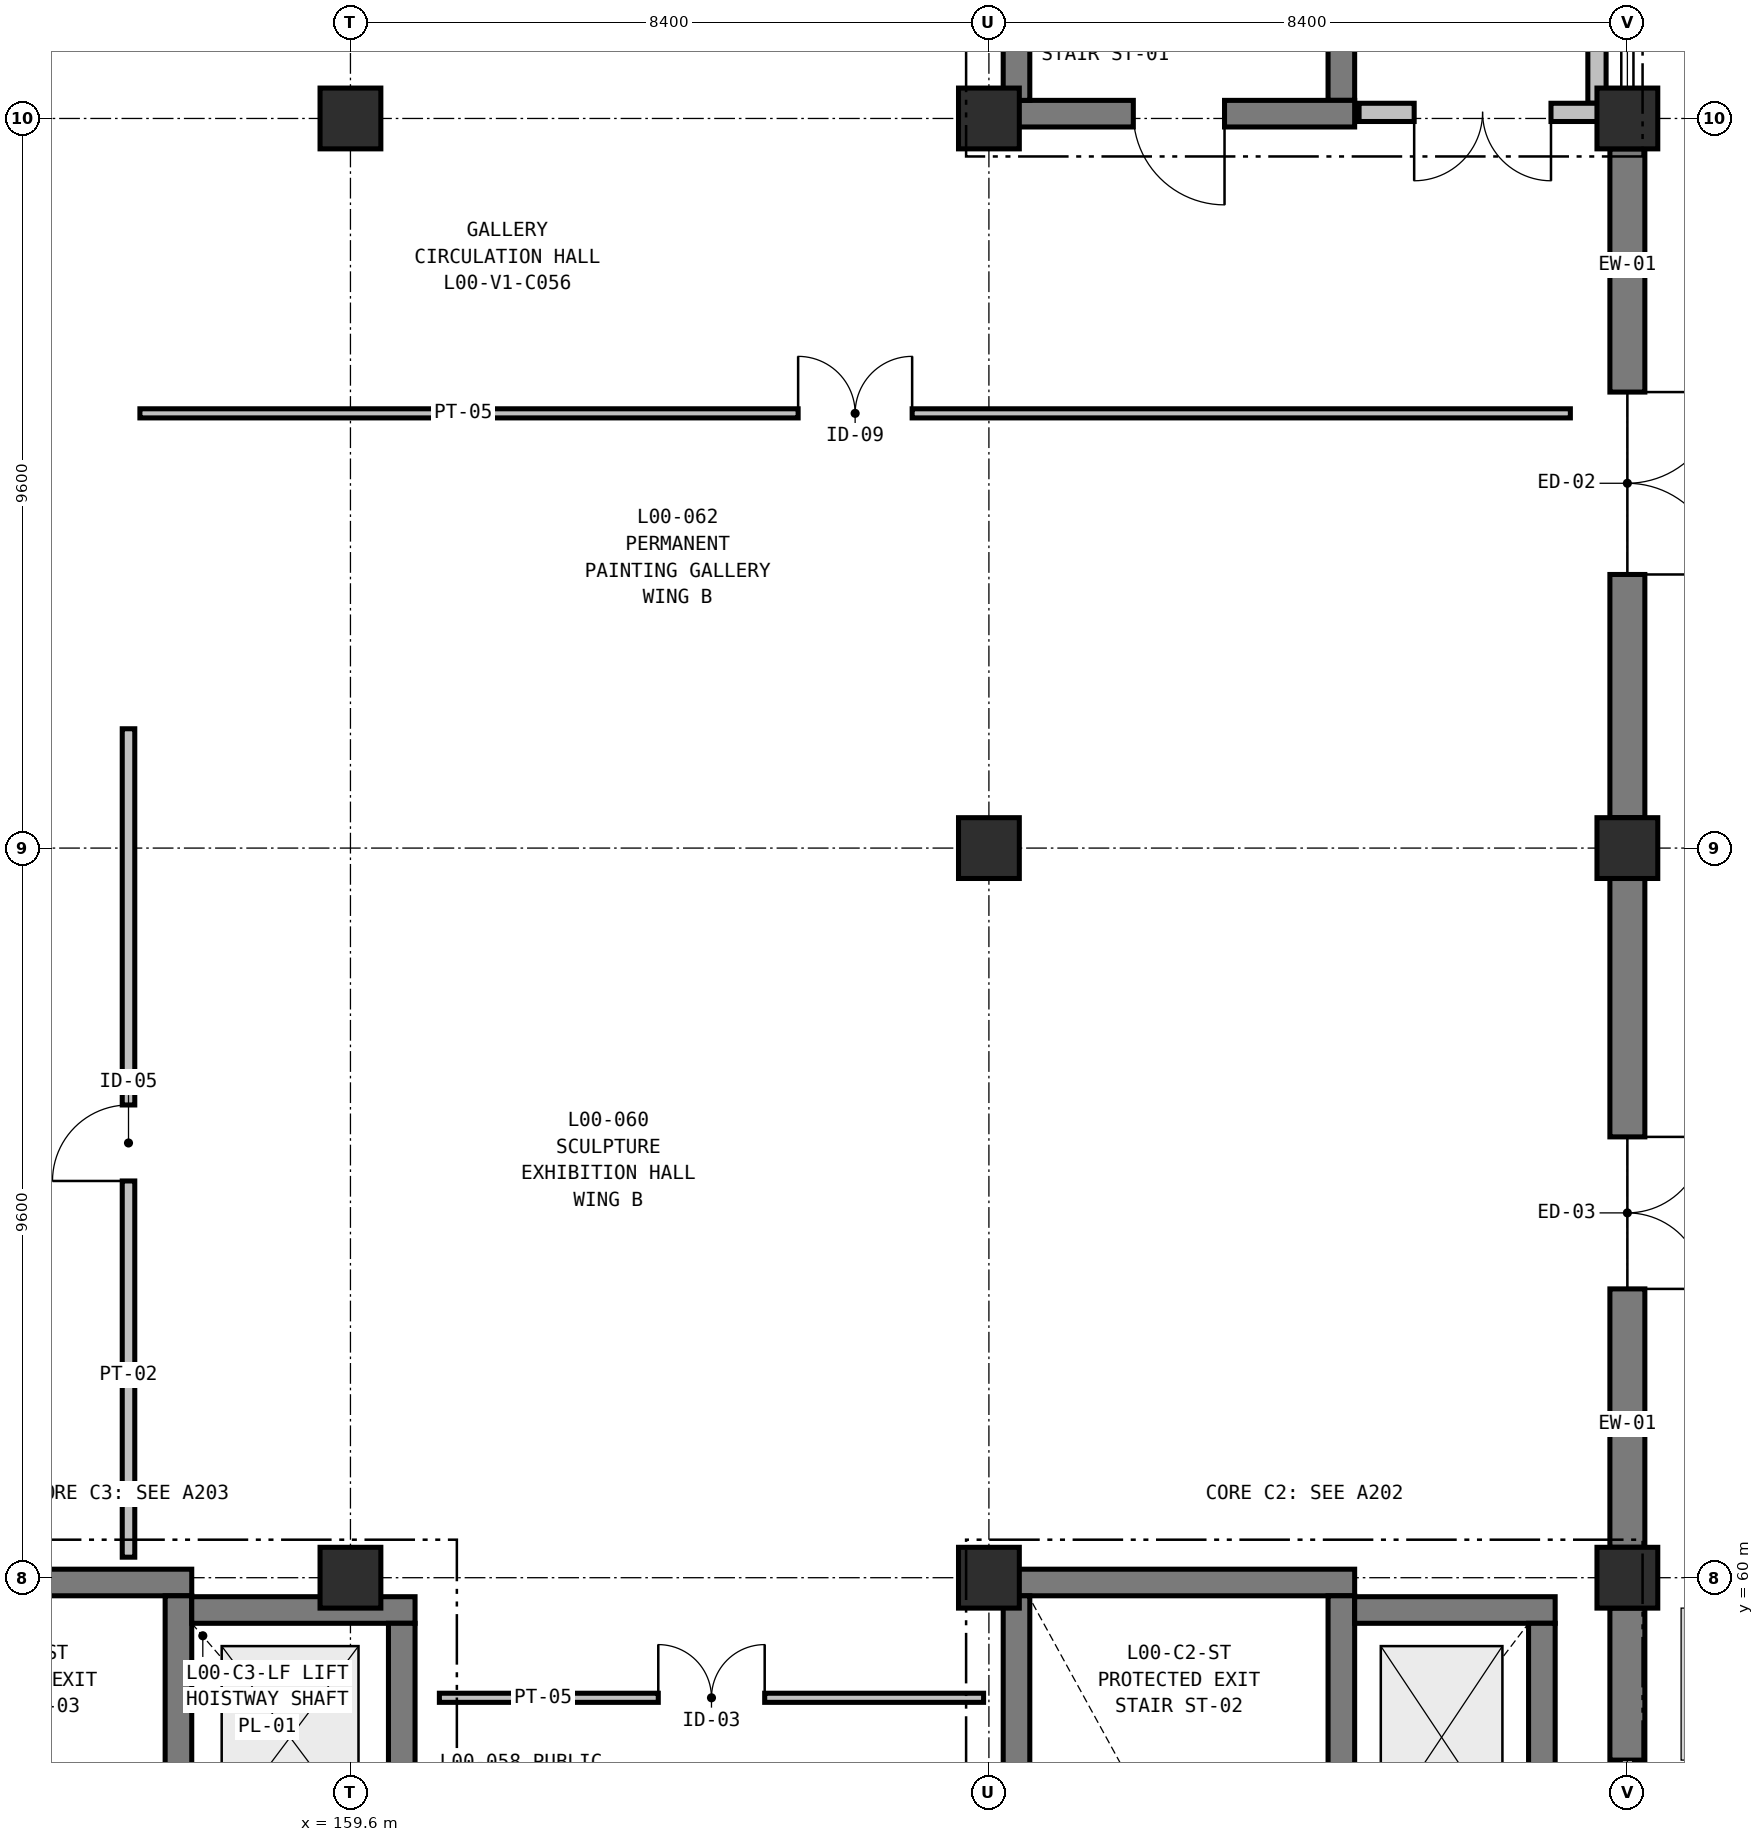
"""IFC4 building model, lengths in metres.
Left out: names, types, materials, properties, quantities, classifications, styles, units other than length and angle.
Written with IfcOpenShell. Run it as: python <this file> out.ifc"""

import sys

from ifc_helpers import new_model, si_unit, direction, frame, frame_2d, origin, origin_2d, place, context, subcontext, project, spatial, rectangle, extrude, element, fill, save


model = new_model("IFC4")
c1 = context("Model", 3, precision=1e-05, world=origin(), true_north=direction((0.0, 1.0)))
c2 = subcontext(c1, "Body", "Model", "MODEL_VIEW")
j1 = project(units=[si_unit("LENGTHUNIT", "METRE"), si_unit("PLANEANGLEUNIT", "RADIAN")], contexts=[c1])
p1 = place(None, origin())
s1 = spatial("IfcSite", under=j1, at=p1, CompositionType="ELEMENT")
p2 = place(p1, origin())
s2 = spatial("IfcBuilding", under=s1, at=p2, CompositionType="ELEMENT")
p3 = place(p2, origin())
s3 = spatial("IfcBuildingStorey", under=s2, at=p3, CompositionType="ELEMENT", Elevation=0.0)
for number, where, z_axis, x_axis in (
    (1, (159.6, 60.0, 0.0), (0.0, 0.0, 1.0), (1.0, 0.0, 0.0)),
    (2, (159.6, 79.2, 0.0), (0.0, 0.0, 1.0), (1.0, 0.0, 0.0)),
    (3, (168.0, 60.0, 0.0), (0.0, 0.0, 1.0), (1.0, 0.0, 0.0)),
    (4, (168.0, 69.6, 0.0), (0.0, 0.0, 1.0), (1.0, 0.0, 0.0)),
    (5, (168.0, 79.2, 0.0), (0.0, 0.0, 1.0), (1.0, 0.0, 0.0)),
    (6, (176.4, 60.0, 0.0), (0.0, 0.0, 1.0), (1.0, 0.0, 0.0)),
    (7, (176.4, 69.6, 0.0), (0.0, 0.0, 1.0), (1.0, 0.0, 0.0)),
    (8, (176.4, 79.2, 0.0), (0.0, 0.0, 1.0), (1.0, 0.0, 0.0)),
):
    element("IfcColumn", number, at=place(p3, frame(where, z_axis=z_axis, x_axis=x_axis)), inside=s3, PredefinedType="COLUMN", context=c2, shape_type="SweptSolid", body=[
        extrude(rectangle(XDim=0.8, YDim=0.8, at=origin_2d()), origin(), (0.0, 0.0, 1.0), 6.0),
    ])
p4 = place(p3, frame((176.4, 78.8, 0.0), z_axis=(0.0, 0.0, 1.0), x_axis=(0.0, -1.0, 0.0)))
e9 = element("IfcWall", 9, at=p4, inside=s3, PredefinedType="SOLIDWALL", context=c2, shape_type="SweptSolid", body=[
    extrude(rectangle(XDim=8.8, YDim=0.46, at=frame_2d((4.4, 0.0))), origin(), (0.0, 0.0, 1.0), 5.68),
])
p5 = place(p4, frame((3.2, 0.0, 0.0)))
e10 = element("IfcOpeningElement", 10, at=p5, cuts=e9, PredefinedType="OPENING", context=c2, shape_type="SweptSolid", body=[
    extrude(rectangle(XDim=2.4, YDim=2.4, at=frame_2d((1.2, 1.2))), frame((0.0, 0.24, 0.0), z_axis=(0.0, -1.0, 0.0), x_axis=(1.0, 0.0, 0.0)), (0.0, 0.0, 1.0), 0.48),
])
p6 = place(p3, frame((176.4, 69.2, 0.0), z_axis=(0.0, 0.0, 1.0), x_axis=(0.0, -1.0, 0.0)))
e11 = element("IfcWall", 11, at=p6, inside=s3, PredefinedType="SOLIDWALL", context=c2, shape_type="SweptSolid", body=[
    extrude(rectangle(XDim=8.8, YDim=0.46, at=frame_2d((4.4, 0.0))), origin(), (0.0, 0.0, 1.0), 5.68),
])
p7 = place(p6, frame((3.4, 0.0, 0.0)))
e12 = element("IfcOpeningElement", 12, at=p7, cuts=e11, PredefinedType="OPENING", context=c2, shape_type="SweptSolid", body=[
    extrude(rectangle(XDim=2.0, YDim=2.3, at=frame_2d((1.0, 1.15))), frame((0.0, 0.24, 0.0), z_axis=(0.0, -1.0, 0.0), x_axis=(1.0, 0.0, 0.0)), (0.0, 0.0, 1.0), 0.48),
])
p8 = place(p3, frame((176.4, 59.6, 0.0), z_axis=(0.0, 0.0, 1.0), x_axis=(0.0, -1.0, 0.0)))
e13 = element("IfcWall", 13, at=p8, inside=s3, PredefinedType="SOLIDWALL", context=c2, shape_type="SweptSolid", body=[
    extrude(rectangle(XDim=2.0, YDim=0.46, at=frame_2d((1.0, 0.0))), origin(), (0.0, 0.0, 1.0), 5.68),
])
p9 = place(p3, frame((172.637, 88.562, 0.0), z_axis=(0.0, 0.0, 1.0), x_axis=(0.0, -1.0, 0.0)))
e14 = element("IfcWall", 14, at=p9, inside=s3, PredefinedType="SHEAR", context=c2, shape_type="SweptSolid", body=[
    extrude(rectangle(XDim=9.124, YDim=0.35, at=frame_2d((4.562, 0.0))), origin(), (0.0, 0.0, 1.0), 5.68),
])
p10 = place(p3, frame((172.812, 79.263, 0.0), z_axis=(0.0, 0.0, 1.0), x_axis=(-1.0, 0.0, 0.0)))
e15 = element("IfcWall", 15, at=p10, inside=s3, PredefinedType="SHEAR", context=c2, shape_type="SweptSolid", body=[
    extrude(rectangle(XDim=4.624, YDim=0.35, at=frame_2d((2.312, 0.0))), origin(), (0.0, 0.0, 1.0), 5.68),
])
p11 = place(p10, frame((1.712, 0.0, 0.0)))
e16 = element("IfcOpeningElement", 16, at=p11, cuts=e15, PredefinedType="OPENING", context=c2, shape_type="SweptSolid", body=[
    extrude(rectangle(XDim=1.2, YDim=2.2, at=frame_2d((0.6, 1.1))), frame((0.0, 0.185, 0.0), z_axis=(0.0, -1.0, 0.0), x_axis=(1.0, 0.0, 0.0)), (0.0, 0.0, 1.0), 0.37),
])
p12 = place(p3, frame((168.363, 79.438, 0.0), z_axis=(0.0, 0.0, 1.0), x_axis=(0.0, 1.0, 0.0)))
e17 = element("IfcWall", 17, at=p12, inside=s3, PredefinedType="SHEAR", context=c2, shape_type="SweptSolid", body=[
    extrude(rectangle(XDim=9.124, YDim=0.35, at=frame_2d((4.562, 0.0))), origin(), (0.0, 0.0, 1.0), 5.68),
])
p13 = place(p3, frame((176.0, 84.9, 0.0), z_axis=(0.0, 0.0, 1.0), x_axis=(0.0, -1.0, 0.0)))
e18 = element("IfcWall", 18, at=p13, inside=s3, PredefinedType="PARTITIONING", context=c2, shape_type="SweptSolid", body=[
    extrude(rectangle(XDim=5.5, YDim=0.24, at=frame_2d((2.75, 0.0))), origin(), (0.0, 0.0, 1.0), 5.005),
])
p14 = place(p3, frame((176.12, 79.28, 0.0), z_axis=(0.0, 0.0, 1.0), x_axis=(-1.0, 0.0, 0.0)))
e19 = element("IfcWall", 19, at=p14, inside=s3, PredefinedType="PARTITIONING", context=c2, shape_type="SweptSolid", body=[
    extrude(rectangle(XDim=3.25, YDim=0.24, at=frame_2d((1.625, 0.0))), origin(), (0.0, 0.0, 1.0), 5.005),
])
p15 = place(p14, frame((0.725, 0.0, 0.0)))
e20 = element("IfcOpeningElement", 20, at=p15, cuts=e19, PredefinedType="OPENING", context=c2, shape_type="SweptSolid", body=[
    extrude(rectangle(XDim=1.8, YDim=2.25, at=frame_2d((0.9, 1.125))), frame((0.0, 0.13, 0.0), z_axis=(0.0, -1.0, 0.0), x_axis=(1.0, 0.0, 0.0)), (0.0, 0.0, 1.0), 0.26),
])
p16 = place(p3, frame((168.188, 59.937, 0.0), z_axis=(0.0, 0.0, 1.0), x_axis=(1.0, 0.0, 0.0)))
e21 = element("IfcWall", 21, at=p16, inside=s3, PredefinedType="SHEAR", context=c2, shape_type="SweptSolid", body=[
    extrude(rectangle(XDim=4.624, YDim=0.35, at=frame_2d((2.312, 0.0))), origin(), (0.0, 0.0, 1.0), 5.68),
])
for number, where, z_axis, x_axis in (
    (22, (172.637, 59.762, 0.0), (0.0, 0.0, 1.0), (0.0, -1.0, 0.0)),
    (23, (168.363, 50.638, 0.0), (0.0, 0.0, 1.0), (0.0, 1.0, 0.0)),
):
    element("IfcWall", number, at=place(p3, frame(where, z_axis=z_axis, x_axis=x_axis)), inside=s3, PredefinedType="SHEAR", context=c2, shape_type="SweptSolid", body=[
        extrude(rectangle(XDim=9.124, YDim=0.35, at=frame_2d((4.562, 0.0))), origin(), (0.0, 0.0, 1.0), 5.68),
    ])
p17 = place(p3, frame((172.812, 59.575, 0.0), z_axis=(0.0, 0.0, 1.0), x_axis=(1.0, 0.0, 0.0)))
e24 = element("IfcWall", 24, at=p17, inside=s3, PredefinedType="SHEAR", context=c2, shape_type="SweptSolid", body=[
    extrude(rectangle(XDim=2.638, YDim=0.35, at=frame_2d((1.319, 0.0))), origin(), (0.0, 0.0, 1.0), 5.68),
])
p18 = place(p3, frame((175.275, 59.4, 0.0), z_axis=(0.0, 0.0, 1.0), x_axis=(0.0, -1.0, 0.0)))
e25 = element("IfcWall", 25, at=p18, inside=s3, PredefinedType="SHEAR", context=c2, shape_type="SweptSolid", body=[
    extrude(rectangle(XDim=3.0, YDim=0.35, at=frame_2d((1.5, 0.0))), origin(), (0.0, 0.0, 1.0), 5.68),
])
p19 = place(p3, frame((152.888, 59.937, 0.0), z_axis=(0.0, 0.0, 1.0), x_axis=(1.0, 0.0, 0.0)))
e26 = element("IfcWall", 26, at=p19, inside=s3, PredefinedType="SHEAR", context=c2, shape_type="SweptSolid", body=[
    extrude(rectangle(XDim=4.624, YDim=0.35, at=frame_2d((2.312, 0.0))), origin(), (0.0, 0.0, 1.0), 5.68),
])
p20 = place(p3, frame((157.337, 59.762, 0.0), z_axis=(0.0, 0.0, 1.0), x_axis=(0.0, -1.0, 0.0)))
e27 = element("IfcWall", 27, at=p20, inside=s3, PredefinedType="SHEAR", context=c2, shape_type="SweptSolid", body=[
    extrude(rectangle(XDim=9.124, YDim=0.35, at=frame_2d((4.562, 0.0))), origin(), (0.0, 0.0, 1.0), 5.68),
])
p21 = place(p3, frame((157.512, 59.575, 0.0), z_axis=(0.0, 0.0, 1.0), x_axis=(1.0, 0.0, 0.0)))
e28 = element("IfcWall", 28, at=p21, inside=s3, PredefinedType="SHEAR", context=c2, shape_type="SweptSolid", body=[
    extrude(rectangle(XDim=2.938, YDim=0.35, at=frame_2d((1.469, 0.0))), origin(), (0.0, 0.0, 1.0), 5.68),
])
p22 = place(p3, frame((160.275, 59.4, 0.0), z_axis=(0.0, 0.0, 1.0), x_axis=(0.0, -1.0, 0.0)))
e29 = element("IfcWall", 29, at=p22, inside=s3, PredefinedType="SHEAR", context=c2, shape_type="SweptSolid", body=[
    extrude(rectangle(XDim=3.0, YDim=0.35, at=frame_2d((1.5, 0.0))), origin(), (0.0, 0.0, 1.0), 5.68),
])
p23 = place(p3, frame((160.77, 58.42, 0.0), z_axis=(0.0, 0.0, 1.0), x_axis=(1.0, 0.0, 0.0)))
e30 = element("IfcWall", 30, at=p23, inside=s3, PredefinedType="PARTITIONING", context=c2, shape_type="SweptSolid", body=[
    extrude(rectangle(XDim=7.16, YDim=0.12, at=frame_2d((3.58, 0.0))), origin(), (0.0, 0.0, 1.0), 4.855),
])
p24 = place(p23, frame((2.88, 0.0, 0.0)))
e31 = element("IfcOpeningElement", 31, at=p24, cuts=e30, PredefinedType="OPENING", context=c2, shape_type="SweptSolid", body=[
    extrude(rectangle(XDim=1.4, YDim=2.3, at=frame_2d((0.7, 1.15))), frame((0.0, 0.07, 0.0), z_axis=(0.0, -1.0, 0.0), x_axis=(1.0, 0.0, 0.0)), (0.0, 0.0, 1.0), 0.14),
])
p25 = place(p3, frame((156.68, 60.27, 0.0), z_axis=(0.0, 0.0, 1.0), x_axis=(0.0, 1.0, 0.0)))
e32 = element("IfcWall", 32, at=p25, inside=s3, PredefinedType="PARTITIONING", context=c2, shape_type="SweptSolid", body=[
    extrude(rectangle(XDim=10.9, YDim=0.165, at=frame_2d((5.45, 0.0))), origin(), (0.0, 0.0, 1.0), 5.005),
])
p26 = place(p25, frame((4.95, 0.0, 0.0)))
e33 = element("IfcOpeningElement", 33, at=p26, cuts=e32, PredefinedType="OPENING", context=c2, shape_type="SweptSolid", body=[
    extrude(rectangle(XDim=1.0, YDim=2.15, at=frame_2d((0.5, 1.075))), frame((0.0, 0.093, 0.0), z_axis=(0.0, -1.0, 0.0), x_axis=(1.0, 0.0, 0.0)), (0.0, 0.0, 1.0), 0.185),
])
p27 = place(p3, frame((156.83, 75.32, 0.0), z_axis=(0.0, 0.0, 1.0), x_axis=(1.0, 0.0, 0.0)))
e34 = element("IfcWall", 34, at=p27, inside=s3, PredefinedType="PARTITIONING", context=c2, shape_type="SweptSolid", body=[
    extrude(rectangle(XDim=18.82, YDim=0.12, at=frame_2d((9.41, 0.0))), origin(), (0.0, 0.0, 1.0), 4.855),
])
p28 = place(p27, frame((8.66, 0.0, 0.0)))
e35 = element("IfcOpeningElement", 35, at=p28, cuts=e34, PredefinedType="OPENING", context=c2, shape_type="SweptSolid", body=[
    extrude(rectangle(XDim=1.5, YDim=2.3, at=frame_2d((0.75, 1.15))), frame((0.0, 0.07, 0.0), z_axis=(0.0, -1.0, 0.0), x_axis=(1.0, 0.0, 0.0)), (0.0, 0.0, 1.0), 0.14),
])
p29 = place(p5, origin())
e36 = element("IfcDoor", 36, at=p29, inside=s3, OperationType="DOUBLE_DOOR_SINGLE_SWING", PredefinedType="DOOR", context=c2, shape_type="SweptSolid", body=[
    extrude(rectangle(XDim=2.4, YDim=2.4, at=frame_2d((1.2, 1.2))), frame((0.0, 0.025, 0.0), z_axis=(0.0, -1.0, 0.0), x_axis=(1.0, 0.0, 0.0)), (0.0, 0.0, 1.0), 0.05),
])
fill(e10, e36)
p30 = place(p7, origin())
e37 = element("IfcDoor", 37, at=p30, inside=s3, OperationType="DOUBLE_DOOR_SINGLE_SWING", PredefinedType="DOOR", context=c2, shape_type="SweptSolid", body=[
    extrude(rectangle(XDim=2.0, YDim=2.3, at=frame_2d((1.0, 1.15))), frame((0.0, 0.025, 0.0), z_axis=(0.0, -1.0, 0.0), x_axis=(1.0, 0.0, 0.0)), (0.0, 0.0, 1.0), 0.05),
])
fill(e12, e37)
p31 = place(p11, origin())
e38 = element("IfcDoor", 38, at=p31, inside=s3, OperationType="SINGLE_SWING_LEFT", PredefinedType="DOOR", context=c2, shape_type="SweptSolid", body=[
    extrude(rectangle(XDim=1.2, YDim=2.2, at=frame_2d((0.6, 1.1))), frame((0.0, 0.025, 0.0), z_axis=(0.0, -1.0, 0.0), x_axis=(1.0, 0.0, 0.0)), (0.0, 0.0, 1.0), 0.05),
])
fill(e16, e38)
p32 = place(p15, origin())
e39 = element("IfcDoor", 39, at=p32, inside=s3, OperationType="DOUBLE_DOOR_SINGLE_SWING", PredefinedType="DOOR", context=c2, shape_type="SweptSolid", body=[
    extrude(rectangle(XDim=1.8, YDim=2.25, at=frame_2d((0.9, 1.125))), frame((0.0, 0.025, 0.0), z_axis=(0.0, -1.0, 0.0), x_axis=(1.0, 0.0, 0.0)), (0.0, 0.0, 1.0), 0.05),
])
fill(e20, e39)
p33 = place(p24, origin())
e40 = element("IfcDoor", 40, at=p33, inside=s3, OperationType="DOUBLE_DOOR_SINGLE_SWING", PredefinedType="DOOR", context=c2, shape_type="SweptSolid", body=[
    extrude(rectangle(XDim=1.4, YDim=2.3, at=frame_2d((0.7, 1.15))), frame((0.0, 0.025, 0.0), z_axis=(0.0, -1.0, 0.0), x_axis=(1.0, 0.0, 0.0)), (0.0, 0.0, 1.0), 0.05),
])
fill(e31, e40)
p34 = place(p26, origin())
e41 = element("IfcDoor", 41, at=p34, inside=s3, OperationType="SINGLE_SWING_LEFT", PredefinedType="DOOR", context=c2, shape_type="SweptSolid", body=[
    extrude(rectangle(XDim=1.0, YDim=2.15, at=frame_2d((0.5, 1.075))), frame((0.0, 0.025, 0.0), z_axis=(0.0, -1.0, 0.0), x_axis=(1.0, 0.0, 0.0)), (0.0, 0.0, 1.0), 0.05),
])
fill(e33, e41)
p35 = place(p28, origin())
e42 = element("IfcDoor", 42, at=p35, inside=s3, OperationType="DOUBLE_DOOR_SINGLE_SWING", PredefinedType="DOOR", context=c2, shape_type="SweptSolid", body=[
    extrude(rectangle(XDim=1.5, YDim=2.3, at=frame_2d((0.75, 1.15))), frame((0.0, 0.025, 0.0), z_axis=(0.0, -1.0, 0.0), x_axis=(1.0, 0.0, 0.0)), (0.0, 0.0, 1.0), 0.05),
])
fill(e35, e42)
save(model, sys.argv[1])
